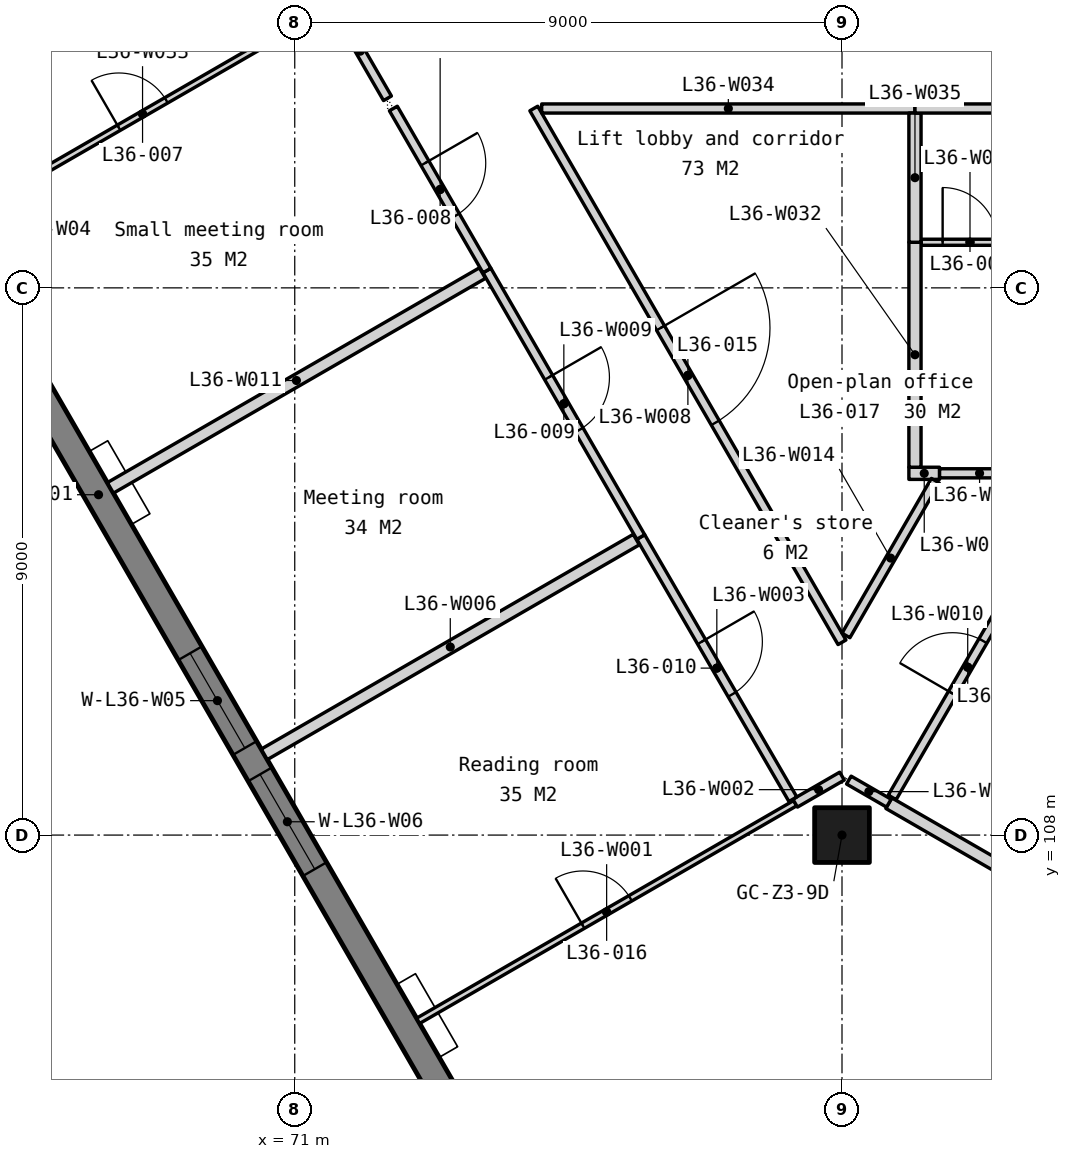
"""IFC4 building model, lengths in metres.
Left out: names, types, materials, properties, quantities, classifications, styles, units other than length and angle.
Written with IfcOpenShell. Run it as: python <this file> out.ifc"""

import sys

from ifc_helpers import new_model, si_unit, direction, frame, frame_2d, origin, origin_2d, place, context, subcontext, project, spatial, polyline, rectangle, outline, extrude, element, fill, save


model = new_model("IFC4")
c1 = context("Model", 3, precision=1e-05, world=origin(), true_north=direction((0.0, 1.0)))
c2 = subcontext(c1, "Body", "Model", "MODEL_VIEW")
j1 = project(units=[si_unit("LENGTHUNIT", "METRE"), si_unit("PLANEANGLEUNIT", "RADIAN")], contexts=[c1])
p1 = place(None, origin())
s1 = spatial("IfcSite", under=j1, at=p1, CompositionType="ELEMENT")
p2 = place(p1, origin())
s2 = spatial("IfcBuilding", under=s1, at=p2, CompositionType="ELEMENT")
p3 = place(p2, frame((0.0, 0.0, 144.2)))
s3 = spatial("IfcBuildingStorey", under=s2, at=p3, CompositionType="ELEMENT", Elevation=144.2)
p4 = place(p3, frame((80.0, 108.0, 0.0), z_axis=(0.0, 0.0, 1.0), x_axis=(1.0, 0.0, 0.0)))
e1 = element("IfcColumn", 1, at=p4, inside=s3, PredefinedType="COLUMN", context=c2, shape_type="SweptSolid", body=[
    extrude(rectangle(XDim=0.9, YDim=0.9, at=origin_2d()), origin(), (0.0, 0.0, 1.0), 3.9),
])
p5 = place(p3, frame((57.652, 131.129, -0.15), z_axis=(0.0, 0.0, 1.0), x_axis=(0.499997369791, -0.866026922331, 0.0)))
e2 = element("IfcWall", 2, at=p5, inside=s3, PredefinedType="SOLIDWALL", context=c2, shape_type="SweptSolid", body=[
    extrude(outline(polyline([(40.486, 0.0), (40.486, 3.9), (0.0, 3.9), (0.0, 0.0), (40.486, 0.0)])), frame((0.0, 0.225, 0.0), z_axis=(0.0, -1.0, 0.0), x_axis=(1.0, 0.0, 0.0)), (0.0, 0.0, 1.0), 0.45),
])
p6 = place(p5, frame((3.011, 0.0, 0.95)))
e3 = element("IfcOpeningElement", 3, at=p6, cuts=e2, PredefinedType="OPENING", context=c2, shape_type="SweptSolid", body=[
    extrude(rectangle(XDim=1.8, YDim=2.2, at=frame_2d((0.9, 1.1))), frame((0.0, 0.235, 0.0), z_axis=(0.0, -1.0, 0.0), x_axis=(1.0, 0.0, 0.0)), (0.0, 0.0, 1.0), 0.47),
])
p7 = place(p5, frame((5.311, 0.0, 0.95)))
e4 = element("IfcOpeningElement", 4, at=p7, cuts=e2, PredefinedType="OPENING", context=c2, shape_type="SweptSolid", body=[
    extrude(rectangle(XDim=1.8, YDim=2.2, at=frame_2d((0.9, 1.1))), frame((0.0, 0.235, 0.0), z_axis=(0.0, -1.0, 0.0), x_axis=(1.0, 0.0, 0.0)), (0.0, 0.0, 1.0), 0.47),
])
p8 = place(p5, frame((13.132, 0.0, 0.95)))
e5 = element("IfcOpeningElement", 5, at=p8, cuts=e2, PredefinedType="OPENING", context=c2, shape_type="SweptSolid", body=[
    extrude(rectangle(XDim=1.8, YDim=2.2, at=frame_2d((0.9, 1.1))), frame((0.0, 0.235, 0.0), z_axis=(0.0, -1.0, 0.0), x_axis=(1.0, 0.0, 0.0)), (0.0, 0.0, 1.0), 0.47),
])
p9 = place(p5, frame((15.432, 0.0, 0.95)))
e6 = element("IfcOpeningElement", 6, at=p9, cuts=e2, PredefinedType="OPENING", context=c2, shape_type="SweptSolid", body=[
    extrude(rectangle(XDim=1.8, YDim=2.2, at=frame_2d((0.9, 1.1))), frame((0.0, 0.235, 0.0), z_axis=(0.0, -1.0, 0.0), x_axis=(1.0, 0.0, 0.0)), (0.0, 0.0, 1.0), 0.47),
])
p10 = place(p5, frame((23.254, 0.0, 0.95)))
e7 = element("IfcOpeningElement", 7, at=p10, cuts=e2, PredefinedType="OPENING", context=c2, shape_type="SweptSolid", body=[
    extrude(rectangle(XDim=1.8, YDim=2.2, at=frame_2d((0.9, 1.1))), frame((0.0, 0.235, 0.0), z_axis=(0.0, -1.0, 0.0), x_axis=(1.0, 0.0, 0.0)), (0.0, 0.0, 1.0), 0.47),
])
p11 = place(p5, frame((25.554, 0.0, 0.95)))
e8 = element("IfcOpeningElement", 8, at=p11, cuts=e2, PredefinedType="OPENING", context=c2, shape_type="SweptSolid", body=[
    extrude(rectangle(XDim=1.8, YDim=2.2, at=frame_2d((0.9, 1.1))), frame((0.0, 0.235, 0.0), z_axis=(0.0, -1.0, 0.0), x_axis=(1.0, 0.0, 0.0)), (0.0, 0.0, 1.0), 0.47),
])
p12 = place(p5, frame((33.375, 0.0, 0.95)))
e9 = element("IfcOpeningElement", 9, at=p12, cuts=e2, PredefinedType="OPENING", context=c2, shape_type="SweptSolid", body=[
    extrude(rectangle(XDim=1.8, YDim=2.2, at=frame_2d((0.9, 1.1))), frame((0.0, 0.235, 0.0), z_axis=(0.0, -1.0, 0.0), x_axis=(1.0, 0.0, 0.0)), (0.0, 0.0, 1.0), 0.47),
])
p13 = place(p5, frame((35.675, 0.0, 0.95)))
e10 = element("IfcOpeningElement", 10, at=p13, cuts=e2, PredefinedType="OPENING", context=c2, shape_type="SweptSolid", body=[
    extrude(rectangle(XDim=1.8, YDim=2.2, at=frame_2d((0.9, 1.1))), frame((0.0, 0.235, 0.0), z_axis=(0.0, -1.0, 0.0), x_axis=(1.0, 0.0, 0.0)), (0.0, 0.0, 1.0), 0.47),
])
p14 = place(p3, frame((82.105, 96.067, -0.15), z_axis=(0.0, 0.0, 1.0), x_axis=(0.499997369791, 0.866026922331, 0.0)))
e11 = element("IfcWall", 11, at=p14, inside=s3, PredefinedType="SOLIDWALL", context=c2, shape_type="SweptSolid", body=[
    extrude(outline(polyline([(40.486, 0.0), (40.486, 3.9), (0.0, 3.9), (0.0, 0.0), (40.486, 0.0)])), frame((0.0, 0.225, 0.0), z_axis=(0.0, -1.0, 0.0), x_axis=(1.0, 0.0, 0.0)), (0.0, 0.0, 1.0), 0.45),
])
p15 = place(p14, frame((3.011, 0.0, 0.95)))
e12 = element("IfcOpeningElement", 12, at=p15, cuts=e11, PredefinedType="OPENING", context=c2, shape_type="SweptSolid", body=[
    extrude(rectangle(XDim=1.8, YDim=2.2, at=frame_2d((0.9, 1.1))), frame((0.0, 0.235, 0.0), z_axis=(0.0, -1.0, 0.0), x_axis=(1.0, 0.0, 0.0)), (0.0, 0.0, 1.0), 0.47),
])
p16 = place(p14, frame((5.311, 0.0, 0.95)))
e13 = element("IfcOpeningElement", 13, at=p16, cuts=e11, PredefinedType="OPENING", context=c2, shape_type="SweptSolid", body=[
    extrude(rectangle(XDim=1.8, YDim=2.2, at=frame_2d((0.9, 1.1))), frame((0.0, 0.235, 0.0), z_axis=(0.0, -1.0, 0.0), x_axis=(1.0, 0.0, 0.0)), (0.0, 0.0, 1.0), 0.47),
])
p17 = place(p14, frame((13.132, 0.0, 0.95)))
e14 = element("IfcOpeningElement", 14, at=p17, cuts=e11, PredefinedType="OPENING", context=c2, shape_type="SweptSolid", body=[
    extrude(rectangle(XDim=1.8, YDim=2.2, at=frame_2d((0.9, 1.1))), frame((0.0, 0.235, 0.0), z_axis=(0.0, -1.0, 0.0), x_axis=(1.0, 0.0, 0.0)), (0.0, 0.0, 1.0), 0.47),
])
p18 = place(p14, frame((15.432, 0.0, 0.95)))
e15 = element("IfcOpeningElement", 15, at=p18, cuts=e11, PredefinedType="OPENING", context=c2, shape_type="SweptSolid", body=[
    extrude(rectangle(XDim=1.8, YDim=2.2, at=frame_2d((0.9, 1.1))), frame((0.0, 0.235, 0.0), z_axis=(0.0, -1.0, 0.0), x_axis=(1.0, 0.0, 0.0)), (0.0, 0.0, 1.0), 0.47),
])
p19 = place(p14, frame((23.254, 0.0, 0.95)))
e16 = element("IfcOpeningElement", 16, at=p19, cuts=e11, PredefinedType="OPENING", context=c2, shape_type="SweptSolid", body=[
    extrude(rectangle(XDim=1.8, YDim=2.2, at=frame_2d((0.9, 1.1))), frame((0.0, 0.235, 0.0), z_axis=(0.0, -1.0, 0.0), x_axis=(1.0, 0.0, 0.0)), (0.0, 0.0, 1.0), 0.47),
])
p20 = place(p14, frame((25.554, 0.0, 0.95)))
e17 = element("IfcOpeningElement", 17, at=p20, cuts=e11, PredefinedType="OPENING", context=c2, shape_type="SweptSolid", body=[
    extrude(rectangle(XDim=1.8, YDim=2.2, at=frame_2d((0.9, 1.1))), frame((0.0, 0.235, 0.0), z_axis=(0.0, -1.0, 0.0), x_axis=(1.0, 0.0, 0.0)), (0.0, 0.0, 1.0), 0.47),
])
p21 = place(p14, frame((33.375, 0.0, 0.95)))
e18 = element("IfcOpeningElement", 18, at=p21, cuts=e11, PredefinedType="OPENING", context=c2, shape_type="SweptSolid", body=[
    extrude(rectangle(XDim=1.8, YDim=2.2, at=frame_2d((0.9, 1.1))), frame((0.0, 0.235, 0.0), z_axis=(0.0, -1.0, 0.0), x_axis=(1.0, 0.0, 0.0)), (0.0, 0.0, 1.0), 0.47),
])
p22 = place(p14, frame((35.675, 0.0, 0.95)))
e19 = element("IfcOpeningElement", 19, at=p22, cuts=e11, PredefinedType="OPENING", context=c2, shape_type="SweptSolid", body=[
    extrude(rectangle(XDim=1.8, YDim=2.2, at=frame_2d((0.9, 1.1))), frame((0.0, 0.235, 0.0), z_axis=(0.0, -1.0, 0.0), x_axis=(1.0, 0.0, 0.0)), (0.0, 0.0, 1.0), 0.47),
])
p23 = place(p3, frame((73.029, 104.945, 0.0), z_axis=(0.0, 0.0, 1.0), x_axis=(0.866033408367, 0.4999861354, 0.0)))
e20 = element("IfcWall", 20, at=p23, inside=s3, PredefinedType="PARTITIONING", context=c2, shape_type="SweptSolid", body=[
    extrude(rectangle(XDim=7.16, YDim=0.1, at=frame_2d((3.58, 0.0))), origin(), (0.0, 0.0, 1.0), 3.75),
])
p24 = place(p23, frame((3.13, 0.0, 0.0)))
e21 = element("IfcOpeningElement", 21, at=p24, cuts=e20, PredefinedType="OPENING", context=c2, shape_type="SweptSolid", body=[
    extrude(rectangle(XDim=0.9, YDim=2.1, at=frame_2d((0.45, 1.05))), frame((0.0, 0.06, 0.0), z_axis=(0.0, -1.0, 0.0), x_axis=(1.0, 0.0, 0.0)), (0.0, 0.0, 1.0), 0.12),
])
p25 = place(p3, frame((79.23, 108.525, 0.0), z_axis=(0.0, 0.0, 1.0), x_axis=(0.865970738743, 0.500094670678, 0.0)))
e22 = element("IfcWall", 22, at=p25, inside=s3, PredefinedType="PARTITIONING", context=c2, shape_type="SweptSolid", body=[
    extrude(rectangle(XDim=0.889, YDim=0.15, at=frame_2d((0.445, 0.0))), origin(), (0.0, 0.0, 1.0), 3.75),
])
p26 = place(p3, frame((76.691, 112.903, 0.0), z_axis=(0.0, 0.0, 1.0), x_axis=(0.501707830428, -0.8650371396, 0.0)))
e23 = element("IfcWall", 23, at=p26, inside=s3, PredefinedType="PARTITIONING", context=c2, shape_type="SweptSolid", body=[
    extrude(rectangle(XDim=4.986, YDim=0.15, at=frame_2d((2.493, 0.0))), origin(), (0.0, 0.0, 1.0), 3.75),
])
p27 = place(p26, frame((1.993, 0.0, 0.0)))
e24 = element("IfcOpeningElement", 24, at=p27, cuts=e23, PredefinedType="OPENING", context=c2, shape_type="SweptSolid", body=[
    extrude(rectangle(XDim=1.0, YDim=2.1, at=frame_2d((0.5, 1.05))), frame((0.0, 0.085, 0.0), z_axis=(0.0, -1.0, 0.0), x_axis=(1.0, 0.0, 0.0)), (0.0, 0.0, 1.0), 0.17),
])
p28 = place(p3, frame((80.77, 108.525, 0.0), z_axis=(0.0, 0.0, 1.0), x_axis=(0.866033408367, -0.4999861354, 0.0)))
e25 = element("IfcWall", 25, at=p28, inside=s3, PredefinedType="PARTITIONING", context=c2, shape_type="SweptSolid", body=[
    extrude(rectangle(XDim=7.16, YDim=0.2, at=frame_2d((3.58, 0.0))), origin(), (0.0, 0.0, 1.0), 3.75),
])
p29 = place(p3, frame((80.113, 108.905, 0.0), z_axis=(0.0, 0.0, 1.0), x_axis=(0.865939322839, -0.50014906694, 0.0)))
e26 = element("IfcWall", 26, at=p29, inside=s3, PredefinedType="PARTITIONING", context=c2, shape_type="SweptSolid", body=[
    extrude(rectangle(XDim=0.76, YDim=0.15, at=frame_2d((0.38, 0.0))), origin(), (0.0, 0.0, 1.0), 3.75),
])
p30 = place(p3, frame((70.499, 109.327, 0.0), z_axis=(0.0, 0.0, 1.0), x_axis=(0.866010067511, 0.500026562264, 0.0)))
e27 = element("IfcWall", 27, at=p30, inside=s3, PredefinedType="PARTITIONING", context=c2, shape_type="SweptSolid", body=[
    extrude(rectangle(XDim=7.065, YDim=0.2, at=frame_2d((3.532, 0.0))), origin(), (0.0, 0.0, 1.0), 3.75),
])
p31 = place(p3, frame((74.931, 119.95, 0.0), z_axis=(0.0, 0.0, 1.0), x_axis=(0.499998319705, -0.866026373901, 0.0)))
e28 = element("IfcWall", 28, at=p31, inside=s3, PredefinedType="PARTITIONING", context=c2, shape_type="SweptSolid", body=[
    extrude(rectangle(XDim=10.138, YDim=0.15, at=frame_2d((5.069, 0.0))), origin(), (0.0, 0.0, 1.0), 3.75),
])
p32 = place(p31, frame((4.169, 0.0, 0.0)))
e29 = element("IfcOpeningElement", 29, at=p32, cuts=e28, PredefinedType="OPENING", context=c2, shape_type="SweptSolid", body=[
    extrude(rectangle(XDim=1.8, YDim=2.1, at=frame_2d((0.9, 1.05))), frame((0.0, 0.085, 0.0), z_axis=(0.0, -1.0, 0.0), x_axis=(1.0, 0.0, 0.0)), (0.0, 0.0, 1.0), 0.17),
])
p33 = place(p3, frame((74.16, 117.285, 0.0), z_axis=(0.0, 0.0, 1.0), x_axis=(0.500035650373, -0.866004820053, 0.0)))
e30 = element("IfcWall", 30, at=p33, inside=s3, PredefinedType="PARTITIONING", context=c2, shape_type="SweptSolid", body=[
    extrude(rectangle(XDim=5.061, YDim=0.15, at=frame_2d((2.53, 0.0))), origin(), (0.0, 0.0, 1.0), 3.75),
])
p34 = place(p33, frame((2.03, 0.0, 0.0)))
e31 = element("IfcOpeningElement", 31, at=p34, cuts=e30, PredefinedType="OPENING", context=c2, shape_type="SweptSolid", body=[
    extrude(rectangle(XDim=1.0, YDim=2.1, at=frame_2d((0.5, 1.05))), frame((0.0, 0.085, 0.0), z_axis=(0.0, -1.0, 0.0), x_axis=(1.0, 0.0, 0.0)), (0.0, 0.0, 1.0), 0.17),
])
p35 = place(p3, frame((80.825, 108.62, 0.0), z_axis=(0.0, 0.0, 1.0), x_axis=(0.501704805906, 0.865038893768, 0.0)))
e32 = element("IfcWall", 32, at=p35, inside=s3, PredefinedType="PARTITIONING", context=c2, shape_type="SweptSolid", body=[
    extrude(rectangle(XDim=4.951, YDim=0.15, at=frame_2d((2.476, 0.0))), origin(), (0.0, 0.0, 1.0), 3.75),
])
p36 = place(p35, frame((1.975, 0.0, 0.0)))
e33 = element("IfcOpeningElement", 33, at=p36, cuts=e32, PredefinedType="OPENING", context=c2, shape_type="SweptSolid", body=[
    extrude(rectangle(XDim=1.0, YDim=2.1, at=frame_2d((0.5, 1.05))), frame((0.0, 0.085, 0.0), z_axis=(0.0, -1.0, 0.0), x_axis=(1.0, 0.0, 0.0)), (0.0, 0.0, 1.0), 0.17),
])
p37 = place(p3, frame((67.968, 113.71, 0.0), z_axis=(0.0, 0.0, 1.0), x_axis=(0.866025031136, 0.500000645445, 0.0)))
e34 = element("IfcWall", 34, at=p37, inside=s3, PredefinedType="PARTITIONING", context=c2, shape_type="SweptSolid", body=[
    extrude(rectangle(XDim=7.065, YDim=0.2, at=frame_2d((3.532, 0.0))), origin(), (0.0, 0.0, 1.0), 3.75),
])
p38 = place(p3, frame((81.1, 113.95, 0.0), z_axis=(0.0, 0.0, 1.0), x_axis=(1.0, 0.0, 0.0)))
e35 = element("IfcWall", 35, at=p38, inside=s3, PredefinedType="PARTITIONING", context=c2, shape_type="SweptSolid", body=[
    extrude(rectangle(XDim=0.505, YDim=0.2, at=frame_2d((0.252, 0.0))), origin(), (0.0, 0.0, 1.0), 3.75),
])
p39 = place(p3, frame((80.065, 111.283, 0.0), z_axis=(0.0, 0.0, 1.0), x_axis=(0.499962090823, 0.866047289552, 0.0)))
e36 = element("IfcWall", 36, at=p39, inside=s3, PredefinedType="PARTITIONING", context=c2, shape_type="SweptSolid", body=[
    extrude(rectangle(XDim=2.94, YDim=0.15, at=frame_2d((1.47, 0.0))), origin(), (0.0, 0.0, 1.0), 3.75),
])
p40 = place(p3, frame((81.605, 113.95, 0.0), z_axis=(0.0, 0.0, 1.0), x_axis=(1.0, 0.0, 0.0)))
e37 = element("IfcWall", 37, at=p40, inside=s3, PredefinedType="PARTITIONING", context=c2, shape_type="SweptSolid", body=[
    extrude(rectangle(XDim=1.315, YDim=0.15, at=frame_2d((0.658, 0.0))), origin(), (0.0, 0.0, 1.0), 3.75),
])
p41 = place(p3, frame((72.622, 119.95, 0.0), z_axis=(0.0, 0.0, 1.0), x_axis=(0.4999536902, -0.866052139109, 0.0)))
e38 = element("IfcWall", 38, at=p41, inside=s3, PredefinedType="PARTITIONING", context=c2, shape_type="SweptSolid", body=[
    extrude(rectangle(XDim=3.077, YDim=0.15, at=frame_2d((1.539, 0.0))), origin(), (0.0, 0.0, 1.0), 3.75),
])
p42 = place(p41, frame((1.039, 0.0, 0.0)))
e39 = element("IfcOpeningElement", 39, at=p42, cuts=e38, PredefinedType="OPENING", context=c2, shape_type="SweptSolid", body=[
    extrude(rectangle(XDim=1.0, YDim=2.1, at=frame_2d((0.5, 1.05))), frame((0.0, 0.085, 0.0), z_axis=(0.0, -1.0, 0.0), x_axis=(1.0, 0.0, 0.0)), (0.0, 0.0, 1.0), 0.17),
])
p43 = place(p3, frame((81.3, 117.75, 0.0), z_axis=(0.0, 0.0, 1.0), x_axis=(1.0, 0.0, 0.0)))
e40 = element("IfcWall", 40, at=p43, inside=s3, PredefinedType="PARTITIONING", context=c2, shape_type="SweptSolid", body=[
    extrude(rectangle(XDim=1.61, YDim=0.1, at=frame_2d((0.805, 0.0))), origin(), (0.0, 0.0, 1.0), 3.75),
])
p44 = place(p43, frame((0.355, 0.0, 0.0)))
e41 = element("IfcOpeningElement", 41, at=p44, cuts=e40, PredefinedType="OPENING", context=c2, shape_type="SweptSolid", body=[
    extrude(rectangle(XDim=0.9, YDim=2.1, at=frame_2d((0.45, 1.05))), frame((0.0, 0.06, 0.0), z_axis=(0.0, -1.0, 0.0), x_axis=(1.0, 0.0, 0.0)), (0.0, 0.0, 1.0), 0.12),
])
p45 = place(p3, frame((81.2, 114.05, 0.0), z_axis=(0.0, 0.0, 1.0), x_axis=(0.0, 1.0, 0.0)))
e42 = element("IfcWall", 42, at=p45, inside=s3, PredefinedType="PARTITIONING", context=c2, shape_type="SweptSolid", body=[
    extrude(rectangle(XDim=3.7, YDim=0.2, at=frame_2d((1.85, 0.0))), origin(), (0.0, 0.0, 1.0), 3.75),
])
p46 = place(p3, frame((65.438, 118.093, 0.0), z_axis=(0.0, 0.0, 1.0), x_axis=(0.866025031136, 0.500000645445, 0.0)))
e43 = element("IfcWall", 43, at=p46, inside=s3, PredefinedType="PARTITIONING", context=c2, shape_type="SweptSolid", body=[
    extrude(rectangle(XDim=7.065, YDim=0.1, at=frame_2d((3.532, 0.0))), origin(), (0.0, 0.0, 1.0), 3.75),
])
p47 = place(p46, frame((3.083, 0.0, 0.0)))
e44 = element("IfcOpeningElement", 44, at=p47, cuts=e43, PredefinedType="OPENING", context=c2, shape_type="SweptSolid", body=[
    extrude(rectangle(XDim=0.9, YDim=2.1, at=frame_2d((0.45, 1.05))), frame((0.0, 0.06, 0.0), z_axis=(0.0, -1.0, 0.0), x_axis=(1.0, 0.0, 0.0)), (0.0, 0.0, 1.0), 0.12),
])
p48 = place(p3, frame((75.061, 119.95, 0.0), z_axis=(0.0, 0.0, 1.0), x_axis=(1.0, 0.0, 0.0)))
e45 = element("IfcWall", 45, at=p48, inside=s3, PredefinedType="PARTITIONING", context=c2, shape_type="SweptSolid", body=[
    extrude(rectangle(XDim=6.139, YDim=0.15, at=frame_2d((3.069, 0.0))), origin(), (0.0, 0.0, 1.0), 3.75),
])
p49 = place(p3, frame((81.2, 117.75, 0.0), z_axis=(0.0, 0.0, 1.0), x_axis=(0.0, 1.0, 0.0)))
e46 = element("IfcWall", 46, at=p49, inside=s3, PredefinedType="PARTITIONING", context=c2, shape_type="SweptSolid", body=[
    extrude(rectangle(XDim=2.125, YDim=0.2, at=frame_2d((1.062, 0.0))), origin(), (0.0, 0.0, 1.0), 3.75),
])
p50 = place(p3, frame((81.2, 119.95, 0.0), z_axis=(0.0, 0.0, 1.0), x_axis=(1.0, 0.0, 0.0)))
e47 = element("IfcWall", 47, at=p50, inside=s3, PredefinedType="PARTITIONING", context=c2, shape_type="SweptSolid", body=[
    extrude(rectangle(XDim=6.178, YDim=0.15, at=frame_2d((3.089, 0.0))), origin(), (0.0, 0.0, 1.0), 3.75),
])
p51 = place(p50, frame((2.589, 0.0, 0.0)))
e48 = element("IfcOpeningElement", 48, at=p51, cuts=e47, PredefinedType="OPENING", context=c2, shape_type="SweptSolid", body=[
    extrude(rectangle(XDim=1.0, YDim=2.1, at=frame_2d((0.5, 1.05))), frame((0.0, 0.085, 0.0), z_axis=(0.0, -1.0, 0.0), x_axis=(1.0, 0.0, 0.0)), (0.0, 0.0, 1.0), 0.17),
])
p52 = place(p3, frame((71.63, 121.668, 0.0), z_axis=(0.0, 0.0, 1.0), x_axis=(0.499982180423, -0.866035691677, 0.0)))
e49 = element("IfcWall", 49, at=p52, inside=s3, PredefinedType="PARTITIONING", context=c2, shape_type="SweptSolid", body=[
    extrude(rectangle(XDim=1.79, YDim=0.15, at=frame_2d((0.895, 0.0))), origin(), (0.0, 0.0, 1.0), 3.75),
])
p53 = place(p10, origin())
e50 = element("IfcWindow", 50, at=p53, inside=s3, PartitioningType="SINGLE_PANEL", PredefinedType="WINDOW", context=c2, shape_type="SweptSolid", body=[
    extrude(rectangle(XDim=1.8, YDim=2.2, at=frame_2d((0.9, 1.1))), frame((0.0, 0.03, 0.0), z_axis=(0.0, -1.0, 0.0), x_axis=(1.0, 0.0, 0.0)), (0.0, 0.0, 1.0), 0.06),
])
fill(e7, e50)
p54 = place(p11, origin())
e51 = element("IfcWindow", 51, at=p54, inside=s3, PartitioningType="SINGLE_PANEL", PredefinedType="WINDOW", context=c2, shape_type="SweptSolid", body=[
    extrude(rectangle(XDim=1.8, YDim=2.2, at=frame_2d((0.9, 1.1))), frame((0.0, 0.03, 0.0), z_axis=(0.0, -1.0, 0.0), x_axis=(1.0, 0.0, 0.0)), (0.0, 0.0, 1.0), 0.06),
])
fill(e8, e51)
p55 = place(p44, origin())
e52 = element("IfcDoor", 52, at=p55, inside=s3, OperationType="SINGLE_SWING_LEFT", PredefinedType="DOOR", context=c2, shape_type="SweptSolid", body=[
    extrude(rectangle(XDim=0.9, YDim=2.1, at=frame_2d((0.45, 1.05))), frame((0.0, 0.025, 0.0), z_axis=(0.0, -1.0, 0.0), x_axis=(1.0, 0.0, 0.0)), (0.0, 0.0, 1.0), 0.05),
])
fill(e41, e52)
p56 = place(p47, origin())
e53 = element("IfcDoor", 53, at=p56, inside=s3, OperationType="SINGLE_SWING_LEFT", PredefinedType="DOOR", context=c2, shape_type="SweptSolid", body=[
    extrude(rectangle(XDim=0.9, YDim=2.1, at=frame_2d((0.45, 1.05))), frame((0.0, 0.025, 0.0), z_axis=(0.0, -1.0, 0.0), x_axis=(1.0, 0.0, 0.0)), (0.0, 0.0, 1.0), 0.05),
])
fill(e44, e53)
p57 = place(p42, origin())
e54 = element("IfcDoor", 54, at=p57, inside=s3, OperationType="SINGLE_SWING_LEFT", PredefinedType="DOOR", context=c2, shape_type="SweptSolid", body=[
    extrude(rectangle(XDim=1.0, YDim=2.1, at=frame_2d((0.5, 1.05))), frame((0.0, 0.025, 0.0), z_axis=(0.0, -1.0, 0.0), x_axis=(1.0, 0.0, 0.0)), (0.0, 0.0, 1.0), 0.05),
])
fill(e39, e54)
p58 = place(p34, origin())
e55 = element("IfcDoor", 55, at=p58, inside=s3, OperationType="SINGLE_SWING_LEFT", PredefinedType="DOOR", context=c2, shape_type="SweptSolid", body=[
    extrude(rectangle(XDim=1.0, YDim=2.1, at=frame_2d((0.5, 1.05))), frame((0.0, 0.025, 0.0), z_axis=(0.0, -1.0, 0.0), x_axis=(1.0, 0.0, 0.0)), (0.0, 0.0, 1.0), 0.05),
])
fill(e31, e55)
p59 = place(p27, origin())
e56 = element("IfcDoor", 56, at=p59, inside=s3, OperationType="SINGLE_SWING_LEFT", PredefinedType="DOOR", context=c2, shape_type="SweptSolid", body=[
    extrude(rectangle(XDim=1.0, YDim=2.1, at=frame_2d((0.5, 1.05))), frame((0.0, 0.025, 0.0), z_axis=(0.0, -1.0, 0.0), x_axis=(1.0, 0.0, 0.0)), (0.0, 0.0, 1.0), 0.05),
])
fill(e24, e56)
p60 = place(p36, origin())
e57 = element("IfcDoor", 57, at=p60, inside=s3, OperationType="SINGLE_SWING_LEFT", PredefinedType="DOOR", context=c2, shape_type="SweptSolid", body=[
    extrude(rectangle(XDim=1.0, YDim=2.1, at=frame_2d((0.5, 1.05))), frame((0.0, 0.025, 0.0), z_axis=(0.0, -1.0, 0.0), x_axis=(1.0, 0.0, 0.0)), (0.0, 0.0, 1.0), 0.05),
])
fill(e33, e57)
p61 = place(p32, origin())
e58 = element("IfcDoor", 58, at=p61, inside=s3, OperationType="SINGLE_SWING_LEFT", PredefinedType="DOOR", context=c2, shape_type="SweptSolid", body=[
    extrude(rectangle(XDim=1.8, YDim=2.1, at=frame_2d((0.9, 1.05))), frame((0.0, 0.025, 0.0), z_axis=(0.0, -1.0, 0.0), x_axis=(1.0, 0.0, 0.0)), (0.0, 0.0, 1.0), 0.05),
])
fill(e29, e58)
p62 = place(p24, origin())
e59 = element("IfcDoor", 59, at=p62, inside=s3, OperationType="SINGLE_SWING_LEFT", PredefinedType="DOOR", context=c2, shape_type="SweptSolid", body=[
    extrude(rectangle(XDim=0.9, YDim=2.1, at=frame_2d((0.45, 1.05))), frame((0.0, 0.025, 0.0), z_axis=(0.0, -1.0, 0.0), x_axis=(1.0, 0.0, 0.0)), (0.0, 0.0, 1.0), 0.05),
])
fill(e21, e59)
save(model, sys.argv[1])
